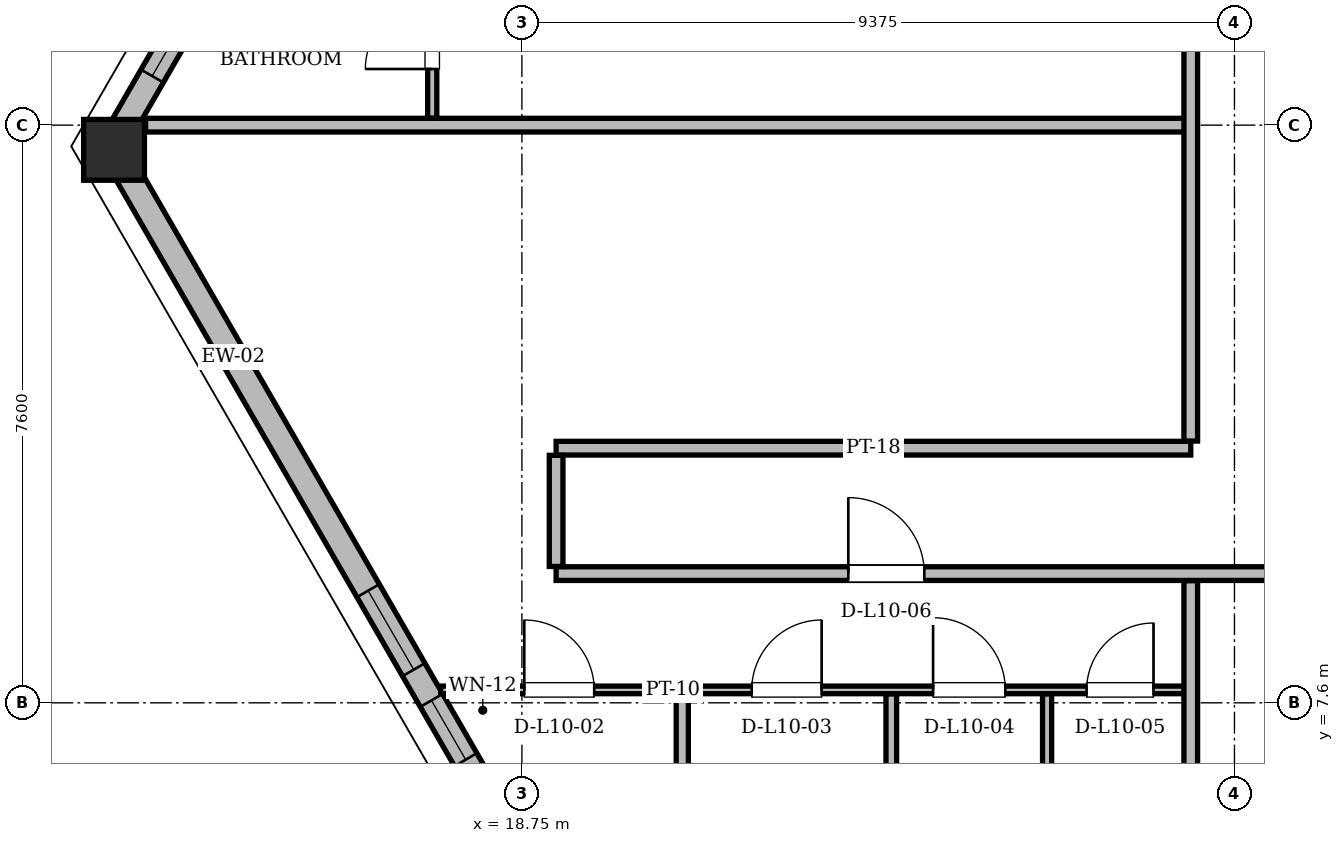
"""IFC4 building model, lengths in metres.
Left out: names, types, materials, properties, quantities, classifications, styles, units other than length and angle.
Written with IfcOpenShell. Run it as: python <this file> out.ifc"""

import sys

from ifc_helpers import new_model, si_unit, direction, frame, frame_2d, origin, origin_2d, place, context, subcontext, project, spatial, rectangle, hollow_rectangle, extrude, element, fill, save


model = new_model("IFC4")
c1 = context("Model", 3, precision=1e-05, world=origin(), true_north=direction((0.0, 1.0)))
c2 = subcontext(c1, "Body", "Model", "MODEL_VIEW")
j1 = project(units=[si_unit("LENGTHUNIT", "METRE"), si_unit("PLANEANGLEUNIT", "RADIAN")], contexts=[c1])
p1 = place(None, origin())
s1 = spatial("IfcSite", under=j1, at=p1, CompositionType="ELEMENT")
p2 = place(p1, origin())
s2 = spatial("IfcBuilding", under=s1, at=p2, CompositionType="ELEMENT")
p3 = place(p2, frame((0.0, 0.0, 41.7)))
s3 = spatial("IfcBuildingStorey", under=s2, at=p3, CompositionType="ELEMENT", Elevation=41.7)
p4 = place(p3, frame((13.352, 14.921, 0.005), z_axis=(0.017804763087, -0.025619830854, 0.999513188847), x_axis=(0.821171487863, 0.570681511459, 0.0)))
e1 = element("IfcColumn", 1, at=p4, inside=s3, PredefinedType="COLUMN", context=c2, shape_type="SweptSolid", body=[
    extrude(hollow_rectangle(XDim=0.8, YDim=0.8, WallThickness=0.065, at=origin_2d()), origin(), (0.0, 0.0, 1.0), 3.593),
])
p5 = place(p3, frame((13.352, 14.921, 0.0), z_axis=(0.0, 0.0, 1.0), x_axis=(0.499998602503, -0.866026210628, 0.0)))
e2 = element("IfcWall", 2, at=p5, inside=s3, PredefinedType="SOLIDWALL", context=c2, shape_type="SweptSolid", body=[
    extrude(rectangle(XDim=15.178, YDim=0.34, at=frame_2d((7.589, 0.0))), origin(), (0.0, 0.0, 1.0), 2.494),
])
p6 = place(p5, frame((6.75, 0.0, 0.85)))
e3 = element("IfcOpeningElement", 3, at=p6, cuts=e2, PredefinedType="OPENING", context=c2, shape_type="SweptSolid", body=[
    extrude(rectangle(XDim=1.2, YDim=1.48, at=frame_2d((0.6, 0.74))), frame((0.0, 0.17, 0.0), z_axis=(0.0, -1.0, 0.0), x_axis=(1.0, 0.0, 0.0)), (0.0, 0.0, 1.0), 0.34),
])
p7 = place(p5, frame((8.417, 0.0, 0.85)))
e4 = element("IfcOpeningElement", 4, at=p7, cuts=e2, PredefinedType="OPENING", context=c2, shape_type="SweptSolid", body=[
    extrude(rectangle(XDim=0.9, YDim=1.15, at=frame_2d((0.45, 0.575))), frame((0.0, 0.17, 0.0), z_axis=(0.0, -1.0, 0.0), x_axis=(1.0, 0.0, 0.0)), (0.0, 0.0, 1.0), 0.34),
])
p8 = place(p3, frame((29.911, 43.603, 0.0), z_axis=(0.0, 0.0, 1.0), x_axis=(-0.500002585961, -0.866023910774, 0.0)))
e5 = element("IfcWall", 5, at=p8, inside=s3, PredefinedType="SOLIDWALL", context=c2, shape_type="SweptSolid", body=[
    extrude(rectangle(XDim=33.118, YDim=0.34, at=frame_2d((16.559, 0.0))), origin(), (0.0, 0.0, 1.0), 2.494),
])
p9 = place(p8, frame((6.369, 0.0, 0.0)))
e6 = element("IfcOpeningElement", 6, at=p9, cuts=e5, PredefinedType="OPENING", context=c2, shape_type="SweptSolid", body=[
    extrude(rectangle(XDim=1.5, YDim=2.2, at=frame_2d((0.75, 1.1))), frame((0.0, 0.17, 0.0), z_axis=(0.0, -1.0, 0.0), x_axis=(1.0, 0.0, 0.0)), (0.0, 0.0, 1.0), 0.34),
])
p10 = place(p8, frame((25.574, 0.0, 0.0)))
e7 = element("IfcOpeningElement", 7, at=p10, cuts=e5, PredefinedType="OPENING", context=c2, shape_type="SweptSolid", body=[
    extrude(rectangle(XDim=1.3, YDim=2.2, at=frame_2d((0.65, 1.1))), frame((0.0, 0.17, 0.0), z_axis=(0.0, -1.0, 0.0), x_axis=(1.0, 0.0, 0.0)), (0.0, 0.0, 1.0), 0.34),
])
p11 = place(p8, frame((11.131, 0.0, 0.85)))
e8 = element("IfcOpeningElement", 8, at=p11, cuts=e5, PredefinedType="OPENING", context=c2, shape_type="SweptSolid", body=[
    extrude(rectangle(XDim=2.0, YDim=1.534, at=frame_2d((1.0, 0.767))), frame((0.0, 0.17, 0.0), z_axis=(0.0, -1.0, 0.0), x_axis=(1.0, 0.0, 0.0)), (0.0, 0.0, 1.0), 0.34),
])
p12 = place(p8, frame((18.613, 0.0, 0.85)))
e9 = element("IfcOpeningElement", 9, at=p12, cuts=e5, PredefinedType="OPENING", context=c2, shape_type="SweptSolid", body=[
    extrude(rectangle(XDim=1.4, YDim=1.534, at=frame_2d((0.7, 0.767))), frame((0.0, 0.17, 0.0), z_axis=(0.0, -1.0, 0.0), x_axis=(1.0, 0.0, 0.0)), (0.0, 0.0, 1.0), 0.34),
])
p13 = place(p8, frame((30.251, 0.0, 0.85)))
e10 = element("IfcOpeningElement", 10, at=p13, cuts=e5, PredefinedType="OPENING", context=c2, shape_type="SweptSolid", body=[
    extrude(rectangle(XDim=1.8, YDim=1.534, at=frame_2d((0.9, 0.767))), frame((0.0, 0.17, 0.0), z_axis=(0.0, -1.0, 0.0), x_axis=(1.0, 0.0, 0.0)), (0.0, 0.0, 1.0), 0.34),
])
p14 = place(p8, frame((28.524, 0.0, 0.85)))
e11 = element("IfcOpeningElement", 11, at=p14, cuts=e5, PredefinedType="OPENING", context=c2, shape_type="SweptSolid", body=[
    extrude(rectangle(XDim=1.2, YDim=1.48, at=frame_2d((0.6, 0.74))), frame((0.0, 0.17, 0.0), z_axis=(0.0, -1.0, 0.0), x_axis=(1.0, 0.0, 0.0)), (0.0, 0.0, 1.0), 0.34),
])
p15 = place(p3, frame((17.681, 7.77, 0.0), z_axis=(0.0, 0.0, 1.0), x_axis=(1.0, 0.0, 0.0)))
e12 = element("IfcWall", 12, at=p15, inside=s3, PredefinedType="PARTITIONING", context=c2, shape_type="SweptSolid", body=[
    extrude(rectangle(XDim=9.919, YDim=0.1, at=frame_2d((4.959, 0.0))), origin(), (0.0, 0.0, 1.0), 2.738),
])
p16 = place(p15, frame((1.1, 0.0, 0.0)))
e13 = element("IfcOpeningElement", 13, at=p16, cuts=e12, PredefinedType="OPENING", context=c2, shape_type="SweptSolid", body=[
    extrude(rectangle(XDim=0.92, YDim=2.12, at=frame_2d((0.46, 1.06))), frame((0.0, 0.05, 0.0), z_axis=(0.0, -1.0, 0.0), x_axis=(1.0, 0.0, 0.0)), (0.0, 0.0, 1.0), 0.1),
])
p17 = place(p15, frame((4.092, 0.0, 0.0)))
e14 = element("IfcOpeningElement", 14, at=p17, cuts=e12, PredefinedType="OPENING", context=c2, shape_type="SweptSolid", body=[
    extrude(rectangle(XDim=0.92, YDim=2.12, at=frame_2d((0.46, 1.06))), frame((0.0, 0.05, 0.0), z_axis=(0.0, -1.0, 0.0), x_axis=(1.0, 0.0, 0.0)), (0.0, 0.0, 1.0), 0.1),
])
p18 = place(p15, frame((6.479, 0.0, 0.0)))
e15 = element("IfcOpeningElement", 15, at=p18, cuts=e12, PredefinedType="OPENING", context=c2, shape_type="SweptSolid", body=[
    extrude(rectangle(XDim=0.95, YDim=2.1, at=frame_2d((0.475, 1.05))), frame((0.0, 0.05, 0.0), z_axis=(0.0, -1.0, 0.0), x_axis=(1.0, 0.0, 0.0)), (0.0, 0.0, 1.0), 0.1),
])
p19 = place(p15, frame((8.499, 0.0, 0.0)))
e16 = element("IfcOpeningElement", 16, at=p19, cuts=e12, PredefinedType="OPENING", context=c2, shape_type="SweptSolid", body=[
    extrude(rectangle(XDim=0.88, YDim=2.08, at=frame_2d((0.44, 1.04))), frame((0.0, 0.05, 0.0), z_axis=(0.0, -1.0, 0.0), x_axis=(1.0, 0.0, 0.0)), (0.0, 0.0, 1.0), 0.1),
])
p20 = place(p3, frame((19.2, 9.3, 0.0), z_axis=(0.0, 0.0, 1.0), x_axis=(1.0, 0.0, 0.0)))
e17 = element("IfcWall", 17, at=p20, inside=s3, PredefinedType="PARTITIONING", context=c2, shape_type="SweptSolid", body=[
    extrude(rectangle(XDim=36.6, YDim=0.18, at=frame_2d((18.3, 0.0))), origin(), (0.0, 0.0, 1.0), 2.738),
])
p21 = place(p20, frame((3.844, 0.0, 0.0)))
e18 = element("IfcOpeningElement", 18, at=p21, cuts=e17, PredefinedType="OPENING", context=c2, shape_type="SweptSolid", body=[
    extrude(rectangle(XDim=1.0, YDim=2.18, at=frame_2d((0.5, 1.09))), frame((0.0, 0.09, 0.0), z_axis=(0.0, -1.0, 0.0), x_axis=(1.0, 0.0, 0.0)), (0.0, 0.0, 1.0), 0.18),
])
p22 = place(p20, frame((11.825, 0.0, 0.0)))
e19 = element("IfcOpeningElement", 19, at=p22, cuts=e17, PredefinedType="OPENING", context=c2, shape_type="SweptSolid", body=[
    extrude(rectangle(XDim=1.0, YDim=2.18, at=frame_2d((0.5, 1.09))), frame((0.0, 0.09, 0.0), z_axis=(0.0, -1.0, 0.0), x_axis=(1.0, 0.0, 0.0)), (0.0, 0.0, 1.0), 0.18),
])
p23 = place(p20, frame((20.387, 0.0, 0.0)))
e20 = element("IfcOpeningElement", 20, at=p23, cuts=e17, PredefinedType="OPENING", context=c2, shape_type="SweptSolid", body=[
    extrude(rectangle(XDim=1.0, YDim=2.18, at=frame_2d((0.5, 1.09))), frame((0.0, 0.09, 0.0), z_axis=(0.0, -1.0, 0.0), x_axis=(1.0, 0.0, 0.0)), (0.0, 0.0, 1.0), 0.18),
])
p24 = place(p20, frame((31.904, 0.0, 0.0)))
e21 = element("IfcOpeningElement", 21, at=p24, cuts=e17, PredefinedType="OPENING", context=c2, shape_type="SweptSolid", body=[
    extrude(rectangle(XDim=1.0, YDim=2.18, at=frame_2d((0.5, 1.09))), frame((0.0, 0.09, 0.0), z_axis=(0.0, -1.0, 0.0), x_axis=(1.0, 0.0, 0.0)), (0.0, 0.0, 1.0), 0.18),
])
p25 = place(p3, frame((19.2, 10.95, 0.0), z_axis=(0.0, 0.0, 1.0), x_axis=(1.0, 0.0, 0.0)))
e22 = element("IfcWall", 22, at=p25, inside=s3, PredefinedType="PARTITIONING", context=c2, shape_type="SweptSolid", body=[
    extrude(rectangle(XDim=8.35, YDim=0.18, at=frame_2d((4.175, 0.0))), origin(), (0.0, 0.0, 1.0), 3.36),
])
p26 = place(p3, frame((13.799, 15.2, 0.0), z_axis=(0.0, 0.0, 1.0), x_axis=(1.0, 0.0, 0.0)))
e23 = element("IfcWall", 23, at=p26, inside=s3, PredefinedType="PARTITIONING", context=c2, shape_type="SweptSolid", body=[
    extrude(rectangle(XDim=13.751, YDim=0.18, at=frame_2d((6.876, 0.0))), origin(), (0.0, 0.0, 1.0), 2.946),
])
p27 = place(p3, frame((17.57, 15.294, 0.0), z_axis=(0.0, 0.0, 1.0), x_axis=(0.0, 1.0, 0.0)))
e24 = element("IfcWall", 24, at=p27, inside=s3, PredefinedType="PARTITIONING", context=c2, shape_type="SweptSolid", body=[
    extrude(rectangle(XDim=6.586, YDim=0.12, at=frame_2d((3.293, 0.0))), origin(), (0.0, 0.0, 1.0), 2.494),
])
p28 = place(p27, frame((0.645, 0.0, 0.0)))
e25 = element("IfcOpeningElement", 25, at=p28, cuts=e24, PredefinedType="OPENING", context=c2, shape_type="SweptSolid", body=[
    extrude(rectangle(XDim=0.88, YDim=2.08, at=frame_2d((0.44, 1.04))), frame((0.0, 0.06, 0.0), z_axis=(0.0, -1.0, 0.0), x_axis=(1.0, 0.0, 0.0)), (0.0, 0.0, 1.0), 0.12),
])
p29 = place(p27, frame((4.783, 0.0, 0.0)))
e26 = element("IfcOpeningElement", 26, at=p29, cuts=e24, PredefinedType="OPENING", context=c2, shape_type="SweptSolid", body=[
    extrude(rectangle(XDim=0.95, YDim=2.1, at=frame_2d((0.475, 1.05))), frame((0.0, 0.06, 0.0), z_axis=(0.0, -1.0, 0.0), x_axis=(1.0, 0.0, 0.0)), (0.0, 0.0, 1.0), 0.12),
])
p30 = place(p3, frame((19.2, 9.394, 0.0), z_axis=(0.0, 0.0, 1.0), x_axis=(0.0, 1.0, 0.0)))
e27 = element("IfcWall", 27, at=p30, inside=s3, PredefinedType="PARTITIONING", context=c2, shape_type="SweptSolid", body=[
    extrude(rectangle(XDim=1.462, YDim=0.18, at=frame_2d((0.731, 0.0))), origin(), (0.0, 0.0, 1.0), 3.36),
])
p31 = place(p3, frame((20.86, 2.264, 0.0), z_axis=(0.0, 0.0, 1.0), x_axis=(0.0, 1.0, 0.0)))
e28 = element("IfcWall", 28, at=p31, inside=s3, PredefinedType="PARTITIONING", context=c2, shape_type="SweptSolid", body=[
    extrude(rectangle(XDim=5.452, YDim=0.16, at=frame_2d((2.726, 0.0))), origin(), (0.0, 0.0, 1.0), 3.36),
])
p32 = place(p3, frame((23.61, 1.95, 0.0), z_axis=(0.0, 0.0, 1.0), x_axis=(0.0, 1.0, 0.0)))
e29 = element("IfcWall", 29, at=p32, inside=s3, PredefinedType="PARTITIONING", context=c2, shape_type="SweptSolid", body=[
    extrude(rectangle(XDim=5.766, YDim=0.14, at=frame_2d((2.883, 0.0))), origin(), (0.0, 0.0, 1.0), 2.738),
])
p33 = place(p3, frame((25.66, 1.95, 0.0), z_axis=(0.0, 0.0, 1.0), x_axis=(0.0, 1.0, 0.0)))
e30 = element("IfcWall", 30, at=p33, inside=s3, PredefinedType="PARTITIONING", context=c2, shape_type="SweptSolid", body=[
    extrude(rectangle(XDim=5.766, YDim=0.12, at=frame_2d((2.883, 0.0))), origin(), (0.0, 0.0, 1.0), 2.738),
])
p34 = place(p3, frame((27.55, 1.95, 0.0), z_axis=(0.0, 0.0, 1.0), x_axis=(0.0, 1.0, 0.0)))
e31 = element("IfcWall", 31, at=p34, inside=s3, PredefinedType="PARTITIONING", context=c2, shape_type="SweptSolid", body=[
    extrude(rectangle(XDim=7.256, YDim=0.18, at=frame_2d((3.628, 0.0))), origin(), (0.0, 0.0, 1.0), 2.738),
])
p35 = place(p3, frame((27.55, 11.044, 0.0), z_axis=(0.0, 0.0, 1.0), x_axis=(0.0, 1.0, 0.0)))
e32 = element("IfcWall", 32, at=p35, inside=s3, PredefinedType="PARTITIONING", context=c2, shape_type="SweptSolid", body=[
    extrude(rectangle(XDim=28.121, YDim=0.18, at=frame_2d((14.061, 0.0))), origin(), (0.0, 0.0, 1.0), 2.494),
])
p36 = place(p35, frame((8.121, 0.0, 0.0)))
e33 = element("IfcOpeningElement", 33, at=p36, cuts=e32, PredefinedType="OPENING", context=c2, shape_type="SweptSolid", body=[
    extrude(rectangle(XDim=1.0, YDim=2.18, at=frame_2d((0.5, 1.09))), frame((0.0, 0.09, 0.0), z_axis=(0.0, -1.0, 0.0), x_axis=(1.0, 0.0, 0.0)), (0.0, 0.0, 1.0), 0.18),
])
p37 = place(p13, origin())
e34 = element("IfcWindow", 34, at=p37, inside=s3, PartitioningType="SINGLE_PANEL", PredefinedType="WINDOW", context=c2, shape_type="SweptSolid", body=[
    extrude(rectangle(XDim=1.8, YDim=1.534, at=frame_2d((0.9, 0.767))), frame((0.0, 0.03, 0.0), z_axis=(0.0, -1.0, 0.0), x_axis=(1.0, 0.0, 0.0)), (0.0, 0.0, 1.0), 0.06),
])
fill(e10, e34)
p38 = place(p6, origin())
e35 = element("IfcWindow", 35, at=p38, inside=s3, PartitioningType="SINGLE_PANEL", PredefinedType="WINDOW", context=c2, shape_type="SweptSolid", body=[
    extrude(rectangle(XDim=1.2, YDim=1.48, at=frame_2d((0.6, 0.74))), frame((0.0, 0.03, 0.0), z_axis=(0.0, -1.0, 0.0), x_axis=(1.0, 0.0, 0.0)), (0.0, 0.0, 1.0), 0.06),
])
fill(e3, e35)
p39 = place(p7, origin())
e36 = element("IfcWindow", 36, at=p39, inside=s3, PartitioningType="SINGLE_PANEL", PredefinedType="WINDOW", context=c2, shape_type="SweptSolid", body=[
    extrude(rectangle(XDim=0.9, YDim=1.15, at=frame_2d((0.45, 0.575))), frame((0.0, 0.03, 0.0), z_axis=(0.0, -1.0, 0.0), x_axis=(1.0, 0.0, 0.0)), (0.0, 0.0, 1.0), 0.06),
])
fill(e4, e36)
p40 = place(p16, origin())
e37 = element("IfcDoor", 37, at=p40, inside=s3, OperationType="SINGLE_SWING_LEFT", PredefinedType="DOOR", context=c2, shape_type="SweptSolid", body=[
    extrude(rectangle(XDim=0.92, YDim=2.12, at=frame_2d((0.46, 1.06))), frame((0.0, 0.025, 0.0), z_axis=(0.0, -1.0, 0.0), x_axis=(1.0, 0.0, 0.0)), (0.0, 0.0, 1.0), 0.05),
])
fill(e13, e37)
p41 = place(p17, origin())
e38 = element("IfcDoor", 38, at=p41, inside=s3, OperationType="SINGLE_SWING_RIGHT", PredefinedType="DOOR", context=c2, shape_type="SweptSolid", body=[
    extrude(rectangle(XDim=0.92, YDim=2.12, at=frame_2d((0.46, 1.06))), frame((0.0, 0.025, 0.0), z_axis=(0.0, -1.0, 0.0), x_axis=(1.0, 0.0, 0.0)), (0.0, 0.0, 1.0), 0.05),
])
fill(e14, e38)
p42 = place(p18, origin())
e39 = element("IfcDoor", 39, at=p42, inside=s3, OperationType="SINGLE_SWING_LEFT", PredefinedType="DOOR", context=c2, shape_type="SweptSolid", body=[
    extrude(rectangle(XDim=0.95, YDim=2.1, at=frame_2d((0.475, 1.05))), frame((0.0, 0.025, 0.0), z_axis=(0.0, -1.0, 0.0), x_axis=(1.0, 0.0, 0.0)), (0.0, 0.0, 1.0), 0.05),
])
fill(e15, e39)
p43 = place(p19, origin())
e40 = element("IfcDoor", 40, at=p43, inside=s3, OperationType="SINGLE_SWING_RIGHT", PredefinedType="DOOR", context=c2, shape_type="SweptSolid", body=[
    extrude(rectangle(XDim=0.88, YDim=2.08, at=frame_2d((0.44, 1.04))), frame((0.0, 0.025, 0.0), z_axis=(0.0, -1.0, 0.0), x_axis=(1.0, 0.0, 0.0)), (0.0, 0.0, 1.0), 0.05),
])
fill(e16, e40)
p44 = place(p21, origin())
e41 = element("IfcDoor", 41, at=p44, inside=s3, OperationType="SINGLE_SWING_LEFT", PredefinedType="DOOR", context=c2, shape_type="SweptSolid", body=[
    extrude(rectangle(XDim=1.0, YDim=2.18, at=frame_2d((0.5, 1.09))), frame((0.0, 0.025, 0.0), z_axis=(0.0, -1.0, 0.0), x_axis=(1.0, 0.0, 0.0)), (0.0, 0.0, 1.0), 0.05),
])
fill(e18, e41)
p45 = place(p28, origin())
e42 = element("IfcDoor", 42, at=p45, inside=s3, OperationType="SINGLE_SWING_LEFT", PredefinedType="DOOR", context=c2, shape_type="SweptSolid", body=[
    extrude(rectangle(XDim=0.88, YDim=2.08, at=frame_2d((0.44, 1.04))), frame((0.0, 0.025, 0.0), z_axis=(0.0, -1.0, 0.0), x_axis=(1.0, 0.0, 0.0)), (0.0, 0.0, 1.0), 0.05),
])
fill(e25, e42)
save(model, sys.argv[1])
